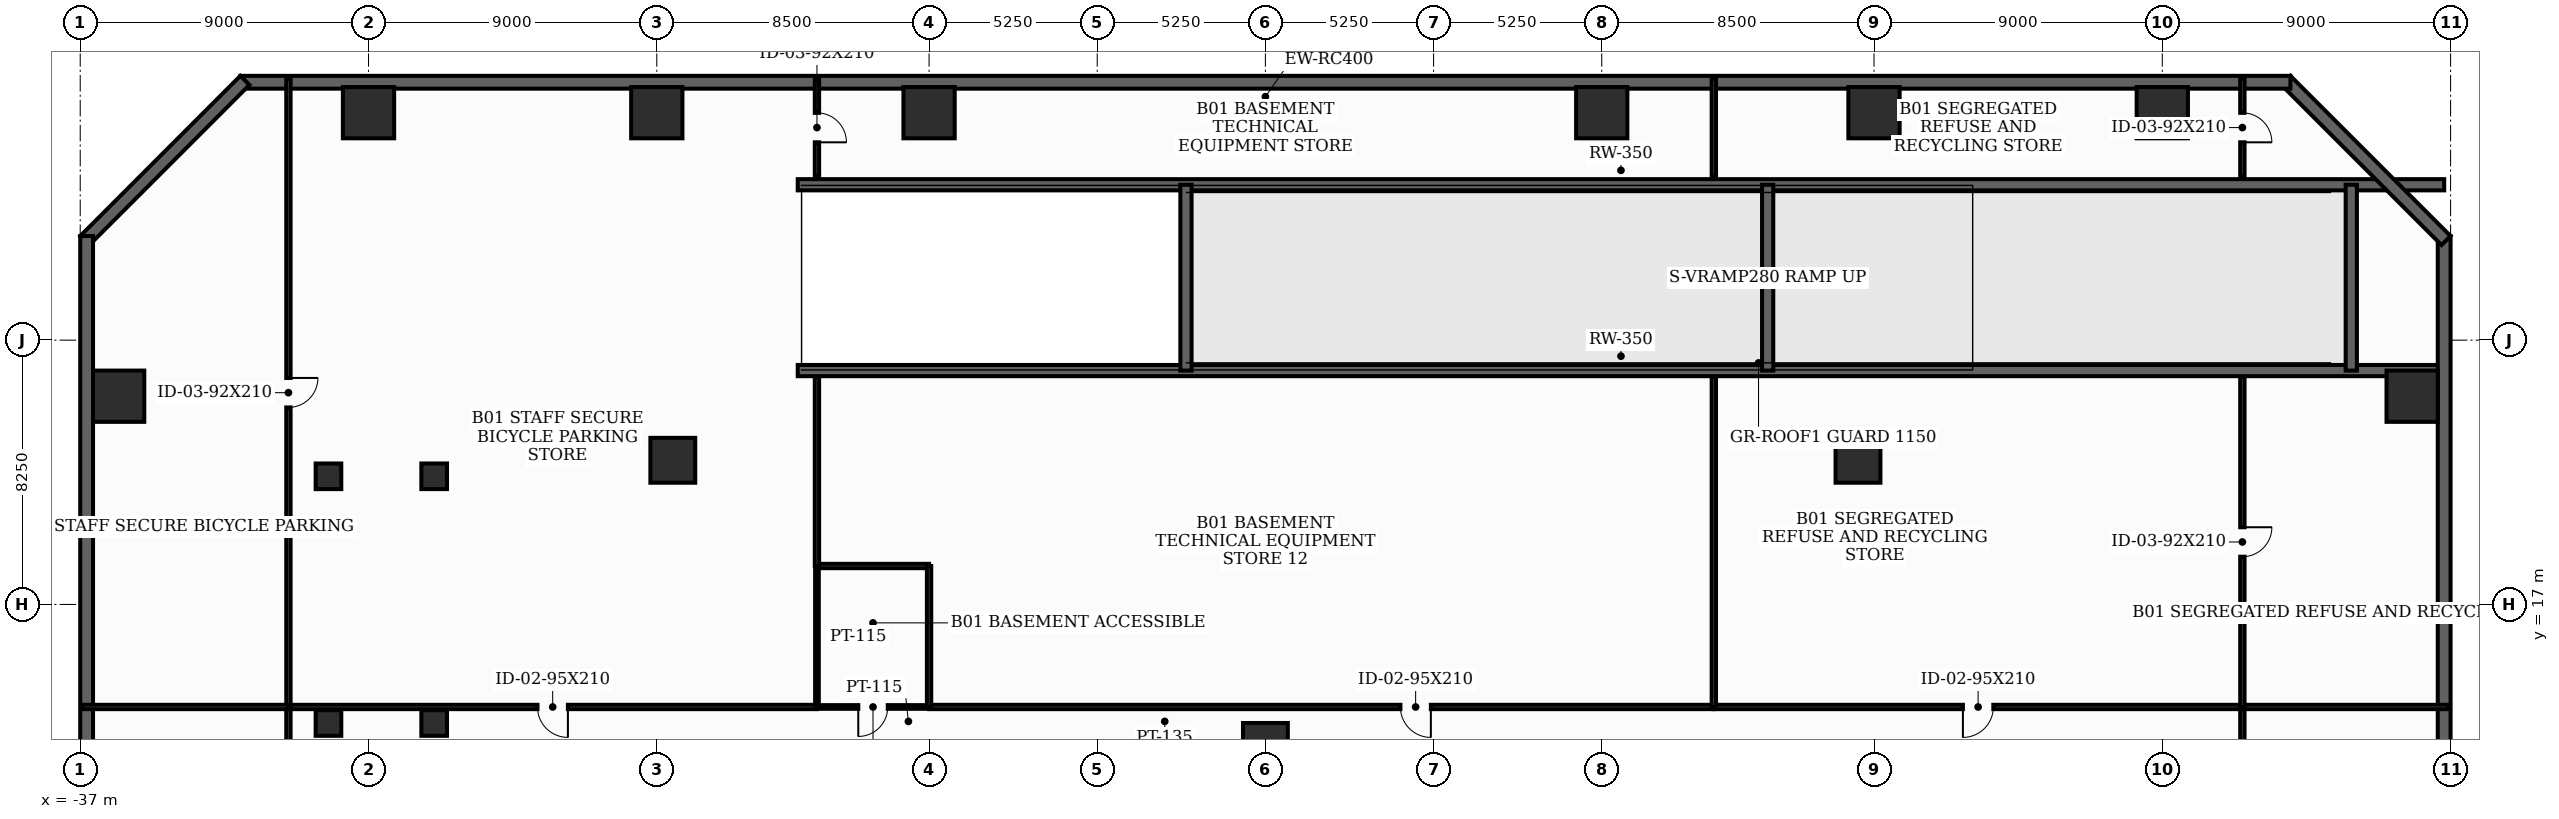
"""IFC4 building model, lengths in metres.
Left out: names, types, materials, properties, quantities, classifications, styles, units other than length and angle.
Written with IfcOpenShell. Run it as: python <this file> out.ifc"""

import sys

from ifc_helpers import new_model, si_unit, direction, frame, frame_2d, origin, origin_2d, place, context, subcontext, project, spatial, rectangle, extrude, element, fill, save


model = new_model("IFC4")
c1 = context("Model", 3, precision=1e-05, world=origin(), true_north=direction((0.0, 1.0)))
c2 = subcontext(c1, "Body", "Model", "MODEL_VIEW")
j1 = project(units=[si_unit("LENGTHUNIT", "METRE"), si_unit("PLANEANGLEUNIT", "RADIAN")], contexts=[c1])
p1 = place(None, origin())
s1 = spatial("IfcSite", under=j1, at=p1, CompositionType="ELEMENT")
p2 = place(p1, origin())
s2 = spatial("IfcBuilding", under=s1, at=p2, CompositionType="ELEMENT")
p3 = place(p2, frame((0.0, 0.0, -4.8)))
s3 = spatial("IfcBuildingStorey", under=s2, at=p3, CompositionType="ELEMENT", Elevation=-4.8)
p4 = place(p3, frame((0.0, 12.6, 0.0), z_axis=(0.0, 0.0, 1.0), x_axis=(1.0, 0.0, 0.0)))
e1 = element("IfcColumn", 1, at=p4, inside=s3, PredefinedType="COLUMN", context=c2, shape_type="SweptSolid", body=[
    extrude(rectangle(XDim=1.4, YDim=1.4, at=origin_2d()), origin(), (0.0, 0.0, 1.0), 4.8),
])
for number, where, z_axis, x_axis in (
    (2, (35.8, 23.5, 0.0), (0.0, 0.0, 1.0), (1.0, 0.0, 0.0)),
    (3, (28.0, 32.35, 0.0), (0.0, 0.0, 1.0), (1.0, 0.0, 0.0)),
    (4, (19.0, 32.35, 0.0), (0.0, 0.0, 1.0), (1.0, 0.0, 0.0)),
    (5, (10.5, 32.35, 0.0), (0.0, 0.0, 1.0), (1.0, 0.0, 0.0)),
    (6, (-10.5, 32.35, 0.0), (0.0, 0.0, 1.0), (1.0, 0.0, 0.0)),
    (7, (-19.0, 32.35, 0.0), (0.0, 0.0, 1.0), (1.0, 0.0, 0.0)),
    (8, (-28.0, 32.35, 0.0), (0.0, 0.0, 1.0), (1.0, 0.0, 0.0)),
    (9, (-35.8, 23.5, 0.0), (0.0, 0.0, 1.0), (1.0, 0.0, 0.0)),
):
    element("IfcColumn", number, at=place(p3, frame(where, z_axis=z_axis, x_axis=x_axis)), inside=s3, PredefinedType="COLUMN", context=c2, shape_type="SweptSolid", body=[
        extrude(rectangle(XDim=1.6, YDim=1.6, at=origin_2d()), origin(), (0.0, 0.0, 1.0), 4.8),
    ])
for number, where, z_axis, x_axis in (
    (10, (-18.5, 21.5, 0.0), (0.0, 0.0, 1.0), (1.0, 0.0, 0.0)),
    (11, (18.5, 21.5, 0.0), (0.0, 0.0, 1.0), (1.0, 0.0, 0.0)),
):
    element("IfcColumn", number, at=place(p3, frame(where, z_axis=z_axis, x_axis=x_axis)), inside=s3, PredefinedType="COLUMN", context=c2, shape_type="SweptSolid", body=[
        extrude(rectangle(XDim=1.4, YDim=1.4, at=origin_2d()), origin(), (0.0, 0.0, 1.0), 4.8),
    ])
for number, where, z_axis, x_axis in (
    (12, (-29.25, 13.3, 0.0), (0.0, 0.0, 1.0), (1.0, 0.0, 0.0)),
    (13, (-25.95, 13.3, 0.0), (0.0, 0.0, 1.0), (1.0, 0.0, 0.0)),
    (14, (-25.95, 21.0, 0.0), (0.0, 0.0, 1.0), (1.0, 0.0, 0.0)),
    (15, (-29.25, 21.0, 0.0), (0.0, 0.0, 1.0), (1.0, 0.0, 0.0)),
):
    element("IfcColumn", number, at=place(p3, frame(where, z_axis=z_axis, x_axis=x_axis)), inside=s3, PredefinedType="COLUMN", context=c2, shape_type="SweptSolid", body=[
        extrude(rectangle(XDim=0.8, YDim=0.8, at=origin_2d()), origin(), (0.0, 0.0, 1.0), 4.8),
    ])
for number, where, z_axis, x_axis in (
    (16, (-14.6, 24.3, 0.0), (0.0, 0.0, 1.0), (1.0, 0.0, 0.0)),
    (17, (-14.6, 30.1, 0.0), (0.0, 0.0, 1.0), (1.0, 0.0, 0.0)),
):
    element("IfcWall", number, at=place(p3, frame(where, z_axis=z_axis, x_axis=x_axis)), inside=s3, PredefinedType="SHEAR", context=c2, shape_type="SweptSolid", body=[
        extrude(rectangle(XDim=51.4, YDim=0.35, at=frame_2d((25.7, 0.0))), origin(), (0.0, 0.0, 1.0), 4.55),
    ])
p5 = place(p3, frame((33.9, 24.3, 0.0), z_axis=(0.0, 0.0, 1.0), x_axis=(0.0, 1.0, 0.0)))
e18 = element("IfcWall", 18, at=p5, inside=s3, PredefinedType="SHEAR", context=c2, shape_type="SweptSolid", body=[
    extrude(rectangle(XDim=5.8, YDim=0.35, at=frame_2d((2.9, 0.0))), origin(), (0.0, 0.0, 1.0), 4.57),
])
p6 = place(p3, frame((-2.48, 24.3, 0.0), z_axis=(0.0, 0.0, 1.0), x_axis=(0.0, 1.0, 0.0)))
e19 = element("IfcWall", 19, at=p6, inside=s3, PredefinedType="SHEAR", context=c2, shape_type="SweptSolid", body=[
    extrude(rectangle(XDim=5.8, YDim=0.35, at=frame_2d((2.9, 0.0))), origin(), (0.0, 0.0, 1.0), 1.2),
])
p7 = place(p3, frame((15.68, 24.3, 0.0), z_axis=(0.0, 0.0, 1.0), x_axis=(0.0, 1.0, 0.0)))
e20 = element("IfcWall", 20, at=p7, inside=s3, PredefinedType="SHEAR", context=c2, shape_type="SweptSolid", body=[
    extrude(rectangle(XDim=5.8, YDim=0.35, at=frame_2d((2.9, 0.0))), origin(), (0.0, 0.0, 1.0), 2.08),
])
p8 = place(p3, frame((36.8, -19.5, 0.0), z_axis=(0.0, 0.0, 1.0), x_axis=(0.0, 1.0, 0.0)))
e21 = element("IfcWall", 21, at=p8, inside=s3, PredefinedType="USERDEFINED", context=c2, shape_type="SweptSolid", body=[
    extrude(rectangle(XDim=48.0, YDim=0.4, at=frame_2d((24.0, 0.0))), origin(), (0.0, 0.0, 1.0), 4.55),
])
p9 = place(p3, frame((36.859, 28.359, 0.0), z_axis=(0.0, 0.0, 1.0), x_axis=(-0.707106781187, 0.707106781187, 0.0)))
e22 = element("IfcWall", 22, at=p9, inside=s3, PredefinedType="USERDEFINED", context=c2, shape_type="SweptSolid", body=[
    extrude(rectangle(XDim=7.071, YDim=0.4, at=frame_2d((3.536, 0.0))), origin(), (0.0, 0.0, 1.0), 4.55),
])
p10 = place(p3, frame((32.0, 33.3, 0.0), z_axis=(0.0, 0.0, 1.0), x_axis=(-1.0, 0.0, 0.0)))
e23 = element("IfcWall", 23, at=p10, inside=s3, PredefinedType="USERDEFINED", context=c2, shape_type="SweptSolid", body=[
    extrude(rectangle(XDim=64.0, YDim=0.4, at=frame_2d((32.0, 0.0))), origin(), (0.0, 0.0, 1.0), 4.55),
])
p11 = place(p3, frame((-31.859, 33.359, 0.0), z_axis=(0.0, 0.0, 1.0), x_axis=(-0.707106781187, -0.707106781187, 0.0)))
e24 = element("IfcWall", 24, at=p11, inside=s3, PredefinedType="USERDEFINED", context=c2, shape_type="SweptSolid", body=[
    extrude(rectangle(XDim=7.071, YDim=0.4, at=frame_2d((3.536, 0.0))), origin(), (0.0, 0.0, 1.0), 4.55),
])
p12 = place(p3, frame((-36.8, 28.5, 0.0), z_axis=(0.0, 0.0, 1.0), x_axis=(0.0, -1.0, 0.0)))
e25 = element("IfcWall", 25, at=p12, inside=s3, PredefinedType="USERDEFINED", context=c2, shape_type="SweptSolid", body=[
    extrude(rectangle(XDim=48.0, YDim=0.4, at=frame_2d((24.0, 0.0))), origin(), (0.0, 0.0, 1.0), 4.55),
])
p13 = place(p3, frame((30.5, 11.75, 0.0), z_axis=(0.0, 0.0, 1.0), x_axis=(0.0, 1.0, 0.0)))
e26 = element("IfcWall", 26, at=p13, inside=s3, PredefinedType="PARTITIONING", context=c2, shape_type="SweptSolid", body=[
    extrude(rectangle(XDim=2.05, YDim=0.135, at=frame_2d((1.025, 0.0))), origin(), (0.0, 0.0, 1.0), 4.55),
])
p14 = place(p3, frame((30.5, 13.8, 0.0), z_axis=(0.0, 0.0, 1.0), x_axis=(-1.0, 0.0, 0.0)))
e27 = element("IfcWall", 27, at=p14, inside=s3, PredefinedType="PARTITIONING", context=c2, shape_type="SweptSolid", body=[
    extrude(rectangle(XDim=16.5, YDim=0.135, at=frame_2d((8.25, 0.0))), origin(), (0.0, 0.0, 1.0), 3.835),
])
p15 = place(p14, frame((7.775, 0.0, 0.0)))
e28 = element("IfcOpeningElement", 28, at=p15, cuts=e27, PredefinedType="OPENING", context=c2, shape_type="SweptSolid", body=[
    extrude(rectangle(XDim=0.95, YDim=2.1, at=frame_2d((0.475, 1.05))), frame((0.0, 0.077, 0.0), z_axis=(0.0, -1.0, 0.0), x_axis=(1.0, 0.0, 0.0)), (0.0, 0.0, 1.0), 0.155),
])
p16 = place(p3, frame((14.0, 13.8, 0.0), z_axis=(0.0, 0.0, 1.0), x_axis=(-1.0, 0.0, 0.0)))
e29 = element("IfcWall", 29, at=p16, inside=s3, PredefinedType="PARTITIONING", context=c2, shape_type="SweptSolid", body=[
    extrude(rectangle(XDim=24.5, YDim=0.135, at=frame_2d((12.25, 0.0))), origin(), (0.0, 0.0, 1.0), 3.335),
])
p17 = place(p16, frame((8.835, 0.0, 0.0)))
e30 = element("IfcOpeningElement", 30, at=p17, cuts=e29, PredefinedType="OPENING", context=c2, shape_type="SweptSolid", body=[
    extrude(rectangle(XDim=0.95, YDim=2.1, at=frame_2d((0.475, 1.05))), frame((0.0, 0.077, 0.0), z_axis=(0.0, -1.0, 0.0), x_axis=(1.0, 0.0, 0.0)), (0.0, 0.0, 1.0), 0.155),
])
p18 = place(p3, frame((-10.5, 13.8, 0.0), z_axis=(0.0, 0.0, 1.0), x_axis=(-1.0, 0.0, 0.0)))
e31 = element("IfcWall", 31, at=p18, inside=s3, PredefinedType="PARTITIONING", context=c2, shape_type="SweptSolid", body=[
    extrude(rectangle(XDim=3.5, YDim=0.115, at=frame_2d((1.75, 0.0))), origin(), (0.0, 0.0, 1.0), 4.55),
])
p19 = place(p18, frame((1.29, 0.0, 0.0)))
e32 = element("IfcOpeningElement", 32, at=p19, cuts=e31, PredefinedType="OPENING", context=c2, shape_type="SweptSolid", body=[
    extrude(rectangle(XDim=0.92, YDim=2.1, at=frame_2d((0.46, 1.05))), frame((0.0, 0.067, 0.0), z_axis=(0.0, -1.0, 0.0), x_axis=(1.0, 0.0, 0.0)), (0.0, 0.0, 1.0), 0.135),
])
p20 = place(p3, frame((-14.0, 13.8, 0.0), z_axis=(0.0, 0.0, 1.0), x_axis=(-1.0, 0.0, 0.0)))
e33 = element("IfcWall", 33, at=p20, inside=s3, PredefinedType="PARTITIONING", context=c2, shape_type="SweptSolid", body=[
    extrude(rectangle(XDim=16.5, YDim=0.135, at=frame_2d((8.25, 0.0))), origin(), (0.0, 0.0, 1.0), 3.135),
])
p21 = place(p20, frame((7.775, 0.0, 0.0)))
e34 = element("IfcOpeningElement", 34, at=p21, cuts=e33, PredefinedType="OPENING", context=c2, shape_type="SweptSolid", body=[
    extrude(rectangle(XDim=0.95, YDim=2.1, at=frame_2d((0.475, 1.05))), frame((0.0, 0.077, 0.0), z_axis=(0.0, -1.0, 0.0), x_axis=(1.0, 0.0, 0.0)), (0.0, 0.0, 1.0), 0.155),
])
p22 = place(p3, frame((-30.5, 13.8, 0.0), z_axis=(0.0, 0.0, 1.0), x_axis=(0.0, -1.0, 0.0)))
e35 = element("IfcWall", 35, at=p22, inside=s3, PredefinedType="PARTITIONING", context=c2, shape_type="SweptSolid", body=[
    extrude(rectangle(XDim=2.05, YDim=0.135, at=frame_2d((1.025, 0.0))), origin(), (0.0, 0.0, 1.0), 4.55),
])
p23 = place(p3, frame((36.92, 13.8, 0.0), z_axis=(0.0, 0.0, 1.0), x_axis=(-1.0, 0.0, 0.0)))
e36 = element("IfcWall", 36, at=p23, inside=s3, PredefinedType="PARTITIONING", context=c2, shape_type="SweptSolid", body=[
    extrude(rectangle(XDim=6.42, YDim=0.135, at=frame_2d((3.21, 0.0))), origin(), (0.0, 0.0, 1.0), 3.835),
])
p24 = place(p3, frame((30.5, 24.1, 0.0), z_axis=(0.0, 0.0, 1.0), x_axis=(0.0, -1.0, 0.0)))
e37 = element("IfcWall", 37, at=p24, inside=s3, PredefinedType="PARTITIONING", context=c2, shape_type="SweptSolid", body=[
    extrude(rectangle(XDim=10.3, YDim=0.135, at=frame_2d((5.15, 0.0))), origin(), (0.0, 0.0, 1.0), 3.335),
])
p25 = place(p24, frame((4.69, 0.0, 0.0)))
e38 = element("IfcOpeningElement", 38, at=p25, cuts=e37, PredefinedType="OPENING", context=c2, shape_type="SweptSolid", body=[
    extrude(rectangle(XDim=0.92, YDim=2.1, at=frame_2d((0.46, 1.05))), frame((0.0, 0.077, 0.0), z_axis=(0.0, -1.0, 0.0), x_axis=(1.0, 0.0, 0.0)), (0.0, 0.0, 1.0), 0.155),
])
p26 = place(p3, frame((30.5, 33.42, 0.0), z_axis=(0.0, 0.0, 1.0), x_axis=(0.0, -1.0, 0.0)))
e39 = element("IfcWall", 39, at=p26, inside=s3, PredefinedType="PARTITIONING", context=c2, shape_type="SweptSolid", body=[
    extrude(rectangle(XDim=3.07, YDim=0.135, at=frame_2d((1.535, 0.0))), origin(), (0.0, 0.0, 1.0), 4.55),
])
p27 = place(p26, frame((1.075, 0.0, 0.0)))
e40 = element("IfcOpeningElement", 40, at=p27, cuts=e39, PredefinedType="OPENING", context=c2, shape_type="SweptSolid", body=[
    extrude(rectangle(XDim=0.92, YDim=2.1, at=frame_2d((0.46, 1.05))), frame((0.0, 0.077, 0.0), z_axis=(0.0, -1.0, 0.0), x_axis=(1.0, 0.0, 0.0)), (0.0, 0.0, 1.0), 0.155),
])
p28 = place(p3, frame((14.0, 24.1, 0.0), z_axis=(0.0, 0.0, 1.0), x_axis=(0.0, -1.0, 0.0)))
e41 = element("IfcWall", 41, at=p28, inside=s3, PredefinedType="PARTITIONING", context=c2, shape_type="SweptSolid", body=[
    extrude(rectangle(XDim=10.3, YDim=0.135, at=frame_2d((5.15, 0.0))), origin(), (0.0, 0.0, 1.0), 3.335),
])
p29 = place(p3, frame((14.0, 33.42, 0.0), z_axis=(0.0, 0.0, 1.0), x_axis=(0.0, -1.0, 0.0)))
e42 = element("IfcWall", 42, at=p29, inside=s3, PredefinedType="PARTITIONING", context=c2, shape_type="SweptSolid", body=[
    extrude(rectangle(XDim=3.07, YDim=0.135, at=frame_2d((1.535, 0.0))), origin(), (0.0, 0.0, 1.0), 3.835),
])
p30 = place(p3, frame((-14.0, 18.2, 0.0), z_axis=(0.0, 0.0, 1.0), x_axis=(1.0, 0.0, 0.0)))
e43 = element("IfcWall", 43, at=p30, inside=s3, PredefinedType="PARTITIONING", context=c2, shape_type="SweptSolid", body=[
    extrude(rectangle(XDim=3.5, YDim=0.135, at=frame_2d((1.75, 0.0))), origin(), (0.0, 0.0, 1.0), 3.335),
])
p31 = place(p3, frame((-10.5, 18.2, 0.0), z_axis=(0.0, 0.0, 1.0), x_axis=(0.0, -1.0, 0.0)))
e44 = element("IfcWall", 44, at=p31, inside=s3, PredefinedType="PARTITIONING", context=c2, shape_type="SweptSolid", body=[
    extrude(rectangle(XDim=4.4, YDim=0.135, at=frame_2d((2.2, 0.0))), origin(), (0.0, 0.0, 1.0), 3.335),
])
p32 = place(p3, frame((-14.0, 24.1, 0.0), z_axis=(0.0, 0.0, 1.0), x_axis=(0.0, -1.0, 0.0)))
e45 = element("IfcWall", 45, at=p32, inside=s3, PredefinedType="PARTITIONING", context=c2, shape_type="SweptSolid", body=[
    extrude(rectangle(XDim=5.9, YDim=0.135, at=frame_2d((2.95, 0.0))), origin(), (0.0, 0.0, 1.0), 3.335),
])
p33 = place(p3, frame((-14.0, 33.42, 0.0), z_axis=(0.0, 0.0, 1.0), x_axis=(0.0, -1.0, 0.0)))
e46 = element("IfcWall", 46, at=p33, inside=s3, PredefinedType="PARTITIONING", context=c2, shape_type="SweptSolid", body=[
    extrude(rectangle(XDim=3.07, YDim=0.135, at=frame_2d((1.535, 0.0))), origin(), (0.0, 0.0, 1.0), 3.835),
])
p34 = place(p33, frame((1.075, 0.0, 0.0)))
e47 = element("IfcOpeningElement", 47, at=p34, cuts=e46, PredefinedType="OPENING", context=c2, shape_type="SweptSolid", body=[
    extrude(rectangle(XDim=0.92, YDim=2.1, at=frame_2d((0.46, 1.05))), frame((0.0, 0.077, 0.0), z_axis=(0.0, -1.0, 0.0), x_axis=(1.0, 0.0, 0.0)), (0.0, 0.0, 1.0), 0.155),
])
p35 = place(p3, frame((-14.0, 18.2, 0.0), z_axis=(0.0, 0.0, 1.0), x_axis=(0.0, -1.0, 0.0)))
e48 = element("IfcWall", 48, at=p35, inside=s3, PredefinedType="PARTITIONING", context=c2, shape_type="SweptSolid", body=[
    extrude(rectangle(XDim=4.4, YDim=0.115, at=frame_2d((2.2, 0.0))), origin(), (0.0, 0.0, 1.0), 3.835),
])
p36 = place(p3, frame((-30.5, 33.42, 0.0), z_axis=(0.0, 0.0, 1.0), x_axis=(0.0, -1.0, 0.0)))
e49 = element("IfcWall", 49, at=p36, inside=s3, PredefinedType="PARTITIONING", context=c2, shape_type="SweptSolid", body=[
    extrude(rectangle(XDim=19.62, YDim=0.135, at=frame_2d((9.81, 0.0))), origin(), (0.0, 0.0, 1.0), 3.335),
])
p37 = place(p36, frame((9.35, 0.0, 0.0)))
e50 = element("IfcOpeningElement", 50, at=p37, cuts=e49, PredefinedType="OPENING", context=c2, shape_type="SweptSolid", body=[
    extrude(rectangle(XDim=0.92, YDim=2.1, at=frame_2d((0.46, 1.05))), frame((0.0, 0.077, 0.0), z_axis=(0.0, -1.0, 0.0), x_axis=(1.0, 0.0, 0.0)), (0.0, 0.0, 1.0), 0.155),
])
p38 = place(p3, frame((-36.92, 13.8, 0.0), z_axis=(0.0, 0.0, 1.0), x_axis=(1.0, 0.0, 0.0)))
e51 = element("IfcWall", 51, at=p38, inside=s3, PredefinedType="PARTITIONING", context=c2, shape_type="SweptSolid", body=[
    extrude(rectangle(XDim=6.42, YDim=0.135, at=frame_2d((3.21, 0.0))), origin(), (0.0, 0.0, 1.0), 3.835),
])
p39 = place(p15, origin())
e52 = element("IfcDoor", 52, at=p39, inside=s3, OperationType="SINGLE_SWING_RIGHT", PredefinedType="DOOR", context=c2, shape_type="SweptSolid", body=[
    extrude(rectangle(XDim=0.95, YDim=2.1, at=frame_2d((0.475, 1.05))), frame((0.0, 0.025, 0.0), z_axis=(0.0, -1.0, 0.0), x_axis=(1.0, 0.0, 0.0)), (0.0, 0.0, 1.0), 0.05),
])
fill(e28, e52)
p40 = place(p17, origin())
e53 = element("IfcDoor", 53, at=p40, inside=s3, OperationType="SINGLE_SWING_LEFT", PredefinedType="DOOR", context=c2, shape_type="SweptSolid", body=[
    extrude(rectangle(XDim=0.95, YDim=2.1, at=frame_2d((0.475, 1.05))), frame((0.0, 0.025, 0.0), z_axis=(0.0, -1.0, 0.0), x_axis=(1.0, 0.0, 0.0)), (0.0, 0.0, 1.0), 0.05),
])
fill(e30, e53)
p41 = place(p19, origin())
e54 = element("IfcDoor", 54, at=p41, inside=s3, OperationType="SINGLE_SWING_RIGHT", PredefinedType="DOOR", context=c2, shape_type="SweptSolid", body=[
    extrude(rectangle(XDim=0.92, YDim=2.1, at=frame_2d((0.46, 1.05))), frame((0.0, 0.025, 0.0), z_axis=(0.0, -1.0, 0.0), x_axis=(1.0, 0.0, 0.0)), (0.0, 0.0, 1.0), 0.05),
])
fill(e32, e54)
p42 = place(p21, origin())
e55 = element("IfcDoor", 55, at=p42, inside=s3, OperationType="SINGLE_SWING_LEFT", PredefinedType="DOOR", context=c2, shape_type="SweptSolid", body=[
    extrude(rectangle(XDim=0.95, YDim=2.1, at=frame_2d((0.475, 1.05))), frame((0.0, 0.025, 0.0), z_axis=(0.0, -1.0, 0.0), x_axis=(1.0, 0.0, 0.0)), (0.0, 0.0, 1.0), 0.05),
])
fill(e34, e55)
p43 = place(p25, origin())
e56 = element("IfcDoor", 56, at=p43, inside=s3, OperationType="SINGLE_SWING_LEFT", PredefinedType="DOOR", context=c2, shape_type="SweptSolid", body=[
    extrude(rectangle(XDim=0.92, YDim=2.1, at=frame_2d((0.46, 1.05))), frame((0.0, 0.025, 0.0), z_axis=(0.0, -1.0, 0.0), x_axis=(1.0, 0.0, 0.0)), (0.0, 0.0, 1.0), 0.05),
])
fill(e38, e56)
p44 = place(p27, origin())
e57 = element("IfcDoor", 57, at=p44, inside=s3, OperationType="SINGLE_SWING_RIGHT", PredefinedType="DOOR", context=c2, shape_type="SweptSolid", body=[
    extrude(rectangle(XDim=0.92, YDim=2.1, at=frame_2d((0.46, 1.05))), frame((0.0, 0.025, 0.0), z_axis=(0.0, -1.0, 0.0), x_axis=(1.0, 0.0, 0.0)), (0.0, 0.0, 1.0), 0.05),
])
fill(e40, e57)
p45 = place(p34, origin())
e58 = element("IfcDoor", 58, at=p45, inside=s3, OperationType="SINGLE_SWING_RIGHT", PredefinedType="DOOR", context=c2, shape_type="SweptSolid", body=[
    extrude(rectangle(XDim=0.92, YDim=2.1, at=frame_2d((0.46, 1.05))), frame((0.0, 0.025, 0.0), z_axis=(0.0, -1.0, 0.0), x_axis=(1.0, 0.0, 0.0)), (0.0, 0.0, 1.0), 0.05),
])
fill(e47, e58)
p46 = place(p37, origin())
e59 = element("IfcDoor", 59, at=p46, inside=s3, OperationType="SINGLE_SWING_LEFT", PredefinedType="DOOR", context=c2, shape_type="SweptSolid", body=[
    extrude(rectangle(XDim=0.92, YDim=2.1, at=frame_2d((0.46, 1.05))), frame((0.0, 0.025, 0.0), z_axis=(0.0, -1.0, 0.0), x_axis=(1.0, 0.0, 0.0)), (0.0, 0.0, 1.0), 0.05),
])
fill(e50, e59)
save(model, sys.argv[1])
